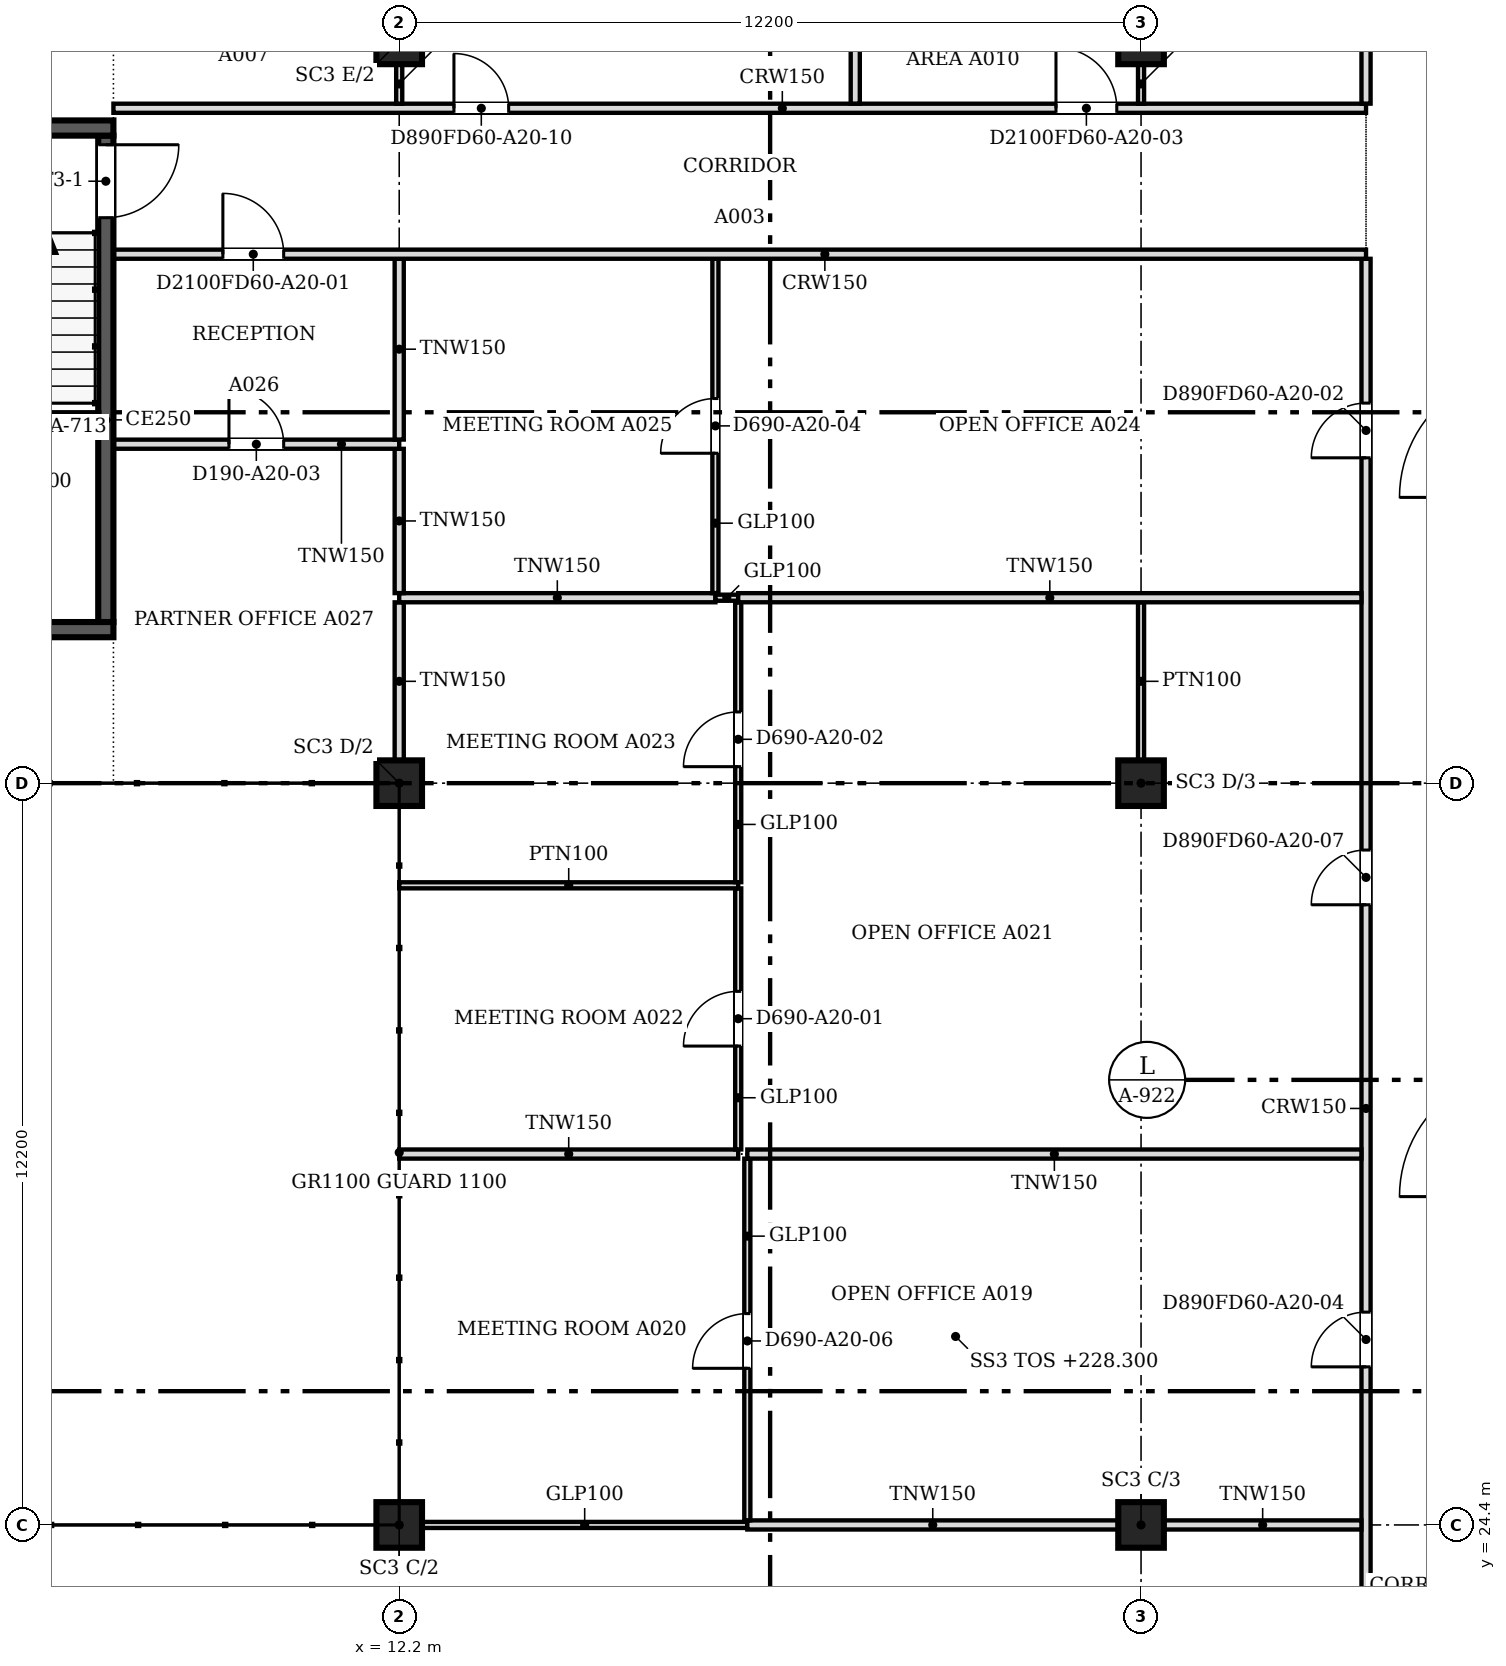
"""IFC4 building model, lengths in metres.
Left out: names, types, materials, properties, quantities, classifications, styles, units other than length and angle.
Written with IfcOpenShell. Run it as: python <this file> out.ifc"""

import sys

from ifc_helpers import new_model, si_unit, direction, frame, frame_2d, origin, origin_2d, place, context, subcontext, project, spatial, rectangle, extrude, source, transform, mapped, element, fill, save


model = new_model("IFC4")
c1 = context("Model", 3, precision=1e-05, world=origin(), true_north=direction((0.0, 1.0)))
c2 = subcontext(c1, "Body", "Model", "MODEL_VIEW")
j1 = project(units=[si_unit("LENGTHUNIT", "METRE"), si_unit("PLANEANGLEUNIT", "RADIAN")], contexts=[c1])
p1 = place(None, origin())
s1 = spatial("IfcSite", under=j1, at=p1, CompositionType="ELEMENT")
p2 = place(p1, origin())
s2 = spatial("IfcBuilding", under=s1, at=p2, CompositionType="ELEMENT")
p3 = place(p2, frame((0.0, 0.0, 228.3)))
s3 = spatial("IfcBuildingStorey", under=s2, at=p3, CompositionType="ELEMENT", Elevation=228.3)
for number, where, z_axis, x_axis in (
    (1, (12.2, 24.4, 0.0), (0.0, 0.0, 1.0), (1.0, 0.0, 0.0)),
    (2, (12.2, 36.6, 0.0), (0.0, 0.0, 1.0), (1.0, 0.0, 0.0)),
    (3, (12.2, 48.8, 0.0), (0.0, 0.0, 1.0), (1.0, 0.0, 0.0)),
    (4, (24.4, 24.4, 0.0), (0.0, 0.0, 1.0), (1.0, 0.0, 0.0)),
    (5, (24.4, 36.6, 0.0), (0.0, 0.0, 1.0), (1.0, 0.0, 0.0)),
    (6, (24.4, 48.8, 0.0), (0.0, 0.0, 1.0), (1.0, 0.0, 0.0)),
):
    element("IfcColumn", number, at=place(p3, frame(where, z_axis=z_axis, x_axis=x_axis)), inside=s3, PredefinedType="COLUMN", context=c2, shape_type="SweptSolid", body=[
        extrude(rectangle(XDim=0.75, YDim=0.75, at=origin_2d()), origin(), (0.0, 0.0, 1.0), 3.5),
    ])
for number, where, z_axis, x_axis in (
    (7, (7.5, 39.125, 0.0), (0.0, 0.0, 1.0), (-1.0, 0.0, 0.0)),
    (8, (3.6, 47.375, 0.0), (0.0, 0.0, 1.0), (1.0, 0.0, 0.0)),
):
    element("IfcWall", number, at=place(p3, frame(where, z_axis=z_axis, x_axis=x_axis)), inside=s3, PredefinedType="SOLIDWALL", context=c2, shape_type="SweptSolid", body=[
        extrude(rectangle(XDim=3.9, YDim=0.25, at=frame_2d((1.95, 0.0))), origin(), (0.0, 0.0, 1.0), 3.8),
    ])
p4 = place(p3, frame((7.375, 47.25, 0.0), z_axis=(0.0, 0.0, 1.0), x_axis=(0.0, -1.0, 0.0)))
e9 = element("IfcWall", 9, at=p4, inside=s3, PredefinedType="SOLIDWALL", context=c2, shape_type="SweptSolid", body=[
    extrude(rectangle(XDim=8.0, YDim=0.25, at=frame_2d((4.0, 0.0))), origin(), (0.0, 0.0, 1.0), 3.8),
])
m1 = source(origin(), c2, "Body", "SweptSolid", [
    extrude(rectangle(XDim=1.2, YDim=2.1, at=frame_2d((0.6, 1.05))), frame((0.0, 0.135, 0.0), z_axis=(0.0, -1.0, 0.0), x_axis=(1.0, 0.0, 0.0)), (0.0, 0.0, 1.0), 0.27),
])
p5 = place(p4, frame((0.15, 0.0, 0.0)))
e10 = element("IfcOpeningElement", 10, at=p5, cuts=e9, PredefinedType="OPENING", context=c2, shape_type="MappedRepresentation", body=[
    mapped(m1, transform((0.0, 0.0, 0.0), scale=1.0)),
])
p6 = place(p3, frame((28.1, 18.8, 0.0), z_axis=(0.0, 0.0, 1.0), x_axis=(0.0, 1.0, 0.0)))
e11 = element("IfcWall", 11, at=p6, inside=s3, PredefinedType="PARTITIONING", context=c2, shape_type="SweptSolid", body=[
    extrude(rectangle(XDim=26.424, YDim=0.15, at=frame_2d((13.212, 0.0))), origin(), (0.0, 0.0, 1.0), 2.888),
])
m2 = source(origin(), c2, "Body", "SweptSolid", [
    extrude(rectangle(XDim=0.9, YDim=2.1, at=frame_2d((0.45, 1.05))), frame((0.0, 0.085, 0.0), z_axis=(0.0, -1.0, 0.0), x_axis=(1.0, 0.0, 0.0)), (0.0, 0.0, 1.0), 0.17),
])
p7 = place(p6, frame((1.1, 0.0, 0.0)))
e12 = element("IfcOpeningElement", 12, at=p7, cuts=e11, PredefinedType="OPENING", context=c2, shape_type="MappedRepresentation", body=[
    mapped(m2, transform((0.0, 0.0, 0.0), scale=1.0)),
])
p8 = place(p6, frame((23.151, 0.0, 0.0)))
e13 = element("IfcOpeningElement", 13, at=p8, cuts=e11, PredefinedType="OPENING", context=c2, shape_type="MappedRepresentation", body=[
    mapped(m2, transform((0.0, 0.0, 0.0), scale=1.0)),
])
p9 = place(p6, frame((8.2, 0.0, 0.0)))
e14 = element("IfcOpeningElement", 14, at=p9, cuts=e11, PredefinedType="OPENING", context=c2, shape_type="MappedRepresentation", body=[
    mapped(m2, transform((0.0, 0.0, 0.0), scale=1.0)),
])
p10 = place(p6, frame((15.8, 0.0, 0.0)))
e15 = element("IfcOpeningElement", 15, at=p10, cuts=e11, PredefinedType="OPENING", context=c2, shape_type="MappedRepresentation", body=[
    mapped(m2, transform((0.0, 0.0, 0.0), scale=1.0)),
])
p11 = place(p3, frame((12.576, 24.4, 0.0), z_axis=(0.0, 0.0, 1.0), x_axis=(1.0, 0.0, 0.0)))
e16 = element("IfcWall", 16, at=p11, inside=s3, PredefinedType="PARTITIONING", context=c2, shape_type="SweptSolid", body=[
    extrude(rectangle(XDim=5.348, YDim=0.1, at=frame_2d((2.674, 0.0))), origin(), (0.0, 0.0, 1.0), 2.888),
])
p12 = place(p3, frame((17.925, 24.4, 0.0), z_axis=(0.0, 0.0, 1.0), x_axis=(1.0, 0.0, 0.0)))
e17 = element("IfcWall", 17, at=p12, inside=s3, PredefinedType="PARTITIONING", context=c2, shape_type="SweptSolid", body=[
    extrude(rectangle(XDim=6.099, YDim=0.15, at=frame_2d((3.049, 0.0))), origin(), (0.0, 0.0, 1.0), 2.888),
])
p13 = place(p3, frame((24.776, 24.4, 0.0), z_axis=(0.0, 0.0, 1.0), x_axis=(1.0, 0.0, 0.0)))
e18 = element("IfcWall", 18, at=p13, inside=s3, PredefinedType="PARTITIONING", context=c2, shape_type="SweptSolid", body=[
    extrude(rectangle(XDim=3.248, YDim=0.15, at=frame_2d((1.624, 0.0))), origin(), (0.0, 0.0, 1.0), 2.888),
])
p14 = place(p3, frame((17.925, 24.476, 0.0), z_axis=(0.0, 0.0, 1.0), x_axis=(0.0, 1.0, 0.0)))
e19 = element("IfcWall", 19, at=p14, inside=s3, PredefinedType="PARTITIONING", context=c2, shape_type="SweptSolid", body=[
    extrude(rectangle(XDim=5.948, YDim=0.1, at=frame_2d((2.974, 0.0))), origin(), (0.0, 0.0, 1.0), 2.888),
])
m3 = source(origin(), c2, "Body", "SweptSolid", [
    extrude(rectangle(XDim=0.9, YDim=2.1, at=frame_2d((0.45, 1.05))), frame((0.0, 0.06, 0.0), z_axis=(0.0, -1.0, 0.0), x_axis=(1.0, 0.0, 0.0)), (0.0, 0.0, 1.0), 0.12),
])
p15 = place(p14, frame((2.5, 0.0, 0.0)))
e20 = element("IfcOpeningElement", 20, at=p15, cuts=e19, PredefinedType="OPENING", context=c2, shape_type="MappedRepresentation", body=[
    mapped(m3, transform((0.0, 0.0, 0.0), scale=1.0)),
])
p16 = place(p3, frame((12.2, 30.5, 0.0), z_axis=(0.0, 0.0, 1.0), x_axis=(1.0, 0.0, 0.0)))
e21 = element("IfcWall", 21, at=p16, inside=s3, PredefinedType="PARTITIONING", context=c2, shape_type="SweptSolid", body=[
    extrude(rectangle(XDim=5.575, YDim=0.15, at=frame_2d((2.788, 0.0))), origin(), (0.0, 0.0, 1.0), 2.888),
])
p17 = place(p3, frame((17.925, 30.5, 0.0), z_axis=(0.0, 0.0, 1.0), x_axis=(1.0, 0.0, 0.0)))
e22 = element("IfcWall", 22, at=p17, inside=s3, PredefinedType="PARTITIONING", context=c2, shape_type="SweptSolid", body=[
    extrude(rectangle(XDim=10.099, YDim=0.15, at=frame_2d((5.049, 0.0))), origin(), (0.0, 0.0, 1.0), 2.888),
])
p18 = place(p3, frame((17.775, 30.576, 0.0), z_axis=(0.0, 0.0, 1.0), x_axis=(0.0, 1.0, 0.0)))
e23 = element("IfcWall", 23, at=p18, inside=s3, PredefinedType="PARTITIONING", context=c2, shape_type="SweptSolid", body=[
    extrude(rectangle(XDim=4.293, YDim=0.1, at=frame_2d((2.147, 0.0))), origin(), (0.0, 0.0, 1.0), 2.888),
])
p19 = place(p18, frame((1.7, 0.0, 0.0)))
e24 = element("IfcOpeningElement", 24, at=p19, cuts=e23, PredefinedType="OPENING", context=c2, shape_type="MappedRepresentation", body=[
    mapped(m3, transform((0.0, 0.0, 0.0), scale=1.0)),
])
p20 = place(p3, frame((12.2, 34.92, 0.0), z_axis=(0.0, 0.0, 1.0), x_axis=(1.0, 0.0, 0.0)))
e25 = element("IfcWall", 25, at=p20, inside=s3, PredefinedType="PARTITIONING", context=c2, shape_type="SweptSolid", body=[
    extrude(rectangle(XDim=5.575, YDim=0.1, at=frame_2d((2.788, 0.0))), origin(), (0.0, 0.0, 1.0), 2.888),
])
p21 = place(p3, frame((17.775, 34.971, 0.0), z_axis=(0.0, 0.0, 1.0), x_axis=(0.0, 1.0, 0.0)))
e26 = element("IfcWall", 26, at=p21, inside=s3, PredefinedType="PARTITIONING", context=c2, shape_type="SweptSolid", body=[
    extrude(rectangle(XDim=4.603, YDim=0.1, at=frame_2d((2.301, 0.0))), origin(), (0.0, 0.0, 1.0), 2.888),
])
p22 = place(p21, frame((1.9, 0.0, 0.0)))
e27 = element("IfcOpeningElement", 27, at=p22, cuts=e26, PredefinedType="OPENING", context=c2, shape_type="MappedRepresentation", body=[
    mapped(m3, transform((0.0, 0.0, 0.0), scale=1.0)),
])
p23 = place(p3, frame((12.2, 36.976, 0.0), z_axis=(0.0, 0.0, 1.0), x_axis=(0.0, 1.0, 0.0)))
e28 = element("IfcWall", 28, at=p23, inside=s3, PredefinedType="PARTITIONING", context=c2, shape_type="SweptSolid", body=[
    extrude(rectangle(XDim=2.598, YDim=0.15, at=frame_2d((1.299, 0.0))), origin(), (0.0, 0.0, 1.0), 2.888),
])
p24 = place(p3, frame((24.4, 36.975, 0.0), z_axis=(0.0, 0.0, 1.0), x_axis=(0.0, 1.0, 0.0)))
e29 = element("IfcWall", 29, at=p24, inside=s3, PredefinedType="PARTITIONING", context=c2, shape_type="SweptSolid", body=[
    extrude(rectangle(XDim=2.6, YDim=0.1, at=frame_2d((1.3, 0.0))), origin(), (0.0, 0.0, 1.0), 2.888),
])
p25 = place(p3, frame((12.2, 39.65, 0.0), z_axis=(0.0, 0.0, 1.0), x_axis=(1.0, 0.0, 0.0)))
e30 = element("IfcWall", 30, at=p25, inside=s3, PredefinedType="PARTITIONING", context=c2, shape_type="SweptSolid", body=[
    extrude(rectangle(XDim=5.2, YDim=0.15, at=frame_2d((2.6, 0.0))), origin(), (0.0, 0.0, 1.0), 2.888),
])
p26 = place(p3, frame((17.401, 39.65, 0.0), z_axis=(0.0, 0.0, 1.0), x_axis=(1.0, 0.0, 0.0)))
e31 = element("IfcWall", 31, at=p26, inside=s3, PredefinedType="PARTITIONING", context=c2, shape_type="SweptSolid", body=[
    extrude(rectangle(XDim=0.373, YDim=0.1, at=frame_2d((0.187, 0.0))), origin(), (0.0, 0.0, 1.0), 2.888),
])
p27 = place(p3, frame((17.775, 39.65, 0.0), z_axis=(0.0, 0.0, 1.0), x_axis=(1.0, 0.0, 0.0)))
e32 = element("IfcWall", 32, at=p27, inside=s3, PredefinedType="PARTITIONING", context=c2, shape_type="SweptSolid", body=[
    extrude(rectangle(XDim=10.249, YDim=0.15, at=frame_2d((5.125, 0.0))), origin(), (0.0, 0.0, 1.0), 2.888),
])
p28 = place(p3, frame((12.2, 39.726, 0.0), z_axis=(0.0, 0.0, 1.0), x_axis=(0.0, 1.0, 0.0)))
e33 = element("IfcWall", 33, at=p28, inside=s3, PredefinedType="PARTITIONING", context=c2, shape_type="SweptSolid", body=[
    extrude(rectangle(XDim=2.373, YDim=0.15, at=frame_2d((1.187, 0.0))), origin(), (0.0, 0.0, 1.0), 2.888),
])
p29 = place(p3, frame((17.4, 39.726, 0.0), z_axis=(0.0, 0.0, 1.0), x_axis=(0.0, 1.0, 0.0)))
e34 = element("IfcWall", 34, at=p29, inside=s3, PredefinedType="PARTITIONING", context=c2, shape_type="SweptSolid", body=[
    extrude(rectangle(XDim=5.498, YDim=0.1, at=frame_2d((2.749, 0.0))), origin(), (0.0, 0.0, 1.0), 2.888),
])
p30 = place(p29, frame((2.3, 0.0, 0.0)))
e35 = element("IfcOpeningElement", 35, at=p30, cuts=e34, PredefinedType="OPENING", context=c2, shape_type="MappedRepresentation", body=[
    mapped(m3, transform((0.0, 0.0, 0.0), scale=1.0)),
])
p31 = place(p3, frame((12.2, 42.175, 0.0), z_axis=(0.0, 0.0, 1.0), x_axis=(-1.0, 0.0, 0.0)))
e36 = element("IfcWall", 36, at=p31, inside=s3, PredefinedType="PARTITIONING", context=c2, shape_type="SweptSolid", body=[
    extrude(rectangle(XDim=4.7, YDim=0.15, at=frame_2d((2.35, 0.0))), origin(), (0.0, 0.0, 1.0), 2.888),
])
p32 = place(p31, frame((1.9, 0.0, 0.0)))
e37 = element("IfcOpeningElement", 37, at=p32, cuts=e36, PredefinedType="OPENING", context=c2, shape_type="MappedRepresentation", body=[
    mapped(m2, transform((0.0, 0.0, 0.0), scale=1.0)),
])
p33 = place(p3, frame((12.2, 42.251, 0.0), z_axis=(0.0, 0.0, 1.0), x_axis=(0.0, 1.0, 0.0)))
e38 = element("IfcWall", 38, at=p33, inside=s3, PredefinedType="PARTITIONING", context=c2, shape_type="SweptSolid", body=[
    extrude(rectangle(XDim=2.973, YDim=0.15, at=frame_2d((1.487, 0.0))), origin(), (0.0, 0.0, 1.0), 2.888),
])
p34 = place(p3, frame((28.1, 45.3, 0.0), z_axis=(0.0, 0.0, 1.0), x_axis=(-1.0, 0.0, 0.0)))
e39 = element("IfcWall", 39, at=p34, inside=s3, PredefinedType="PARTITIONING", context=c2, shape_type="SweptSolid", body=[
    extrude(rectangle(XDim=20.6, YDim=0.15, at=frame_2d((10.3, 0.0))), origin(), (0.0, 0.0, 1.0), 2.888),
])
m4 = source(origin(), c2, "Body", "SweptSolid", [
    extrude(rectangle(XDim=1.0, YDim=2.1, at=frame_2d((0.5, 1.05))), frame((0.0, 0.085, 0.0), z_axis=(0.0, -1.0, 0.0), x_axis=(1.0, 0.0, 0.0)), (0.0, 0.0, 1.0), 0.17),
])
p35 = place(p34, frame((17.8, 0.0, 0.0)))
e40 = element("IfcOpeningElement", 40, at=p35, cuts=e39, PredefinedType="OPENING", context=c2, shape_type="MappedRepresentation", body=[
    mapped(m4, transform((0.0, 0.0, 0.0), scale=1.0)),
])
p36 = place(p3, frame((7.5, 47.7, 0.0), z_axis=(0.0, 0.0, 1.0), x_axis=(1.0, 0.0, 0.0)))
e41 = element("IfcWall", 41, at=p36, inside=s3, PredefinedType="PARTITIONING", context=c2, shape_type="SweptSolid", body=[
    extrude(rectangle(XDim=20.6, YDim=0.15, at=frame_2d((10.3, 0.0))), origin(), (0.0, 0.0, 1.0), 2.888),
])
p37 = place(p36, frame((15.501, 0.0, 0.0)))
e42 = element("IfcOpeningElement", 42, at=p37, cuts=e41, PredefinedType="OPENING", context=c2, shape_type="MappedRepresentation", body=[
    mapped(m4, transform((0.0, 0.0, 0.0), scale=1.0)),
])
p38 = place(p36, frame((5.6, 0.0, 0.0)))
e43 = element("IfcOpeningElement", 43, at=p38, cuts=e41, PredefinedType="OPENING", context=c2, shape_type="MappedRepresentation", body=[
    mapped(m2, transform((0.0, 0.0, 0.0), scale=1.0)),
])
p39 = place(p3, frame((19.7, 47.776, 0.0), z_axis=(0.0, 0.0, 1.0), x_axis=(0.0, 1.0, 0.0)))
e44 = element("IfcWall", 44, at=p39, inside=s3, PredefinedType="PARTITIONING", context=c2, shape_type="SweptSolid", body=[
    extrude(rectangle(XDim=2.698, YDim=0.15, at=frame_2d((1.349, 0.0))), origin(), (0.0, 0.0, 1.0), 2.888),
])
p40 = place(p3, frame((28.1, 47.776, 0.0), z_axis=(0.0, 0.0, 1.0), x_axis=(0.0, 1.0, 0.0)))
e45 = element("IfcWall", 45, at=p40, inside=s3, PredefinedType="PARTITIONING", context=c2, shape_type="SweptSolid", body=[
    extrude(rectangle(XDim=3.348, YDim=0.15, at=frame_2d((1.674, 0.0))), origin(), (0.0, 0.0, 1.0), 2.888),
])
for number, where, z_axis, x_axis in (
    (46, (12.2, 48.425, 0.0), (0.0, 0.0, 1.0), (0.0, -1.0, 0.0)),
    (47, (24.4, 48.425, 0.0), (0.0, 0.0, 1.0), (0.0, -1.0, 0.0)),
):
    element("IfcWall", number, at=place(p3, frame(where, z_axis=z_axis, x_axis=x_axis)), inside=s3, PredefinedType="PARTITIONING", context=c2, shape_type="SweptSolid", body=[
        extrude(rectangle(XDim=0.65, YDim=0.1, at=frame_2d((0.325, 0.0))), origin(), (0.0, 0.0, 1.0), 2.888),
    ])
m5 = source(origin(), c2, "Body", "SweptSolid", [
    extrude(rectangle(XDim=1.2, YDim=2.1, at=frame_2d((0.6, 1.05))), frame((0.0, 0.025, 0.0), z_axis=(0.0, -1.0, 0.0), x_axis=(1.0, 0.0, 0.0)), (0.0, 0.0, 1.0), 0.05),
])
p41 = place(p5, origin())
e48 = element("IfcDoor", 48, at=p41, inside=s3, OperationType="SINGLE_SWING_LEFT", PredefinedType="DOOR", context=c2, shape_type="MappedRepresentation", body=[
    mapped(m5, transform((0.0, 0.0, 0.0), scale=1.0)),
])
fill(e10, e48)
m6 = source(origin(), c2, "Body", "SweptSolid", [
    extrude(rectangle(XDim=0.9, YDim=2.1, at=frame_2d((0.45, 1.05))), frame((0.0, 0.025, 0.0), z_axis=(0.0, -1.0, 0.0), x_axis=(1.0, 0.0, 0.0)), (0.0, 0.0, 1.0), 0.05),
])
p42 = place(p19, origin())
e49 = element("IfcDoor", 49, at=p42, inside=s3, OperationType="SINGLE_SWING_LEFT", PredefinedType="DOOR", context=c2, shape_type="MappedRepresentation", body=[
    mapped(m6, transform((0.0, 0.0, 0.0), scale=1.0)),
])
fill(e24, e49)
p43 = place(p22, origin())
e50 = element("IfcDoor", 50, at=p43, inside=s3, OperationType="SINGLE_SWING_LEFT", PredefinedType="DOOR", context=c2, shape_type="MappedRepresentation", body=[
    mapped(m6, transform((0.0, 0.0, 0.0), scale=1.0)),
])
fill(e27, e50)
m7 = source(origin(), c2, "Body", "SweptSolid", [
    extrude(rectangle(XDim=1.0, YDim=2.1, at=frame_2d((0.5, 1.05))), frame((0.0, 0.025, 0.0), z_axis=(0.0, -1.0, 0.0), x_axis=(1.0, 0.0, 0.0)), (0.0, 0.0, 1.0), 0.05),
])
p44 = place(p35, origin())
e51 = element("IfcDoor", 51, at=p44, inside=s3, OperationType="SINGLE_SWING_RIGHT", PredefinedType="DOOR", context=c2, shape_type="MappedRepresentation", body=[
    mapped(m7, transform((0.0, 0.0, 0.0), scale=1.0)),
])
fill(e40, e51)
p45 = place(p32, origin())
e52 = element("IfcDoor", 52, at=p45, inside=s3, OperationType="SINGLE_SWING_RIGHT", PredefinedType="DOOR", context=c2, shape_type="MappedRepresentation", body=[
    mapped(m6, transform((0.0, 0.0, 0.0), scale=1.0)),
])
fill(e37, e52)
p46 = place(p30, origin())
e53 = element("IfcDoor", 53, at=p46, inside=s3, OperationType="SINGLE_SWING_LEFT", PredefinedType="DOOR", context=c2, shape_type="MappedRepresentation", body=[
    mapped(m6, transform((0.0, 0.0, 0.0), scale=1.0)),
])
fill(e35, e53)
p47 = place(p8, origin())
e54 = element("IfcDoor", 54, at=p47, inside=s3, OperationType="SINGLE_SWING_LEFT", PredefinedType="DOOR", context=c2, shape_type="MappedRepresentation", body=[
    mapped(m6, transform((0.0, 0.0, 0.0), scale=1.0)),
])
fill(e13, e54)
p48 = place(p15, origin())
e55 = element("IfcDoor", 55, at=p48, inside=s3, OperationType="SINGLE_SWING_LEFT", PredefinedType="DOOR", context=c2, shape_type="MappedRepresentation", body=[
    mapped(m6, transform((0.0, 0.0, 0.0), scale=1.0)),
])
fill(e20, e55)
p49 = place(p9, origin())
e56 = element("IfcDoor", 56, at=p49, inside=s3, OperationType="SINGLE_SWING_LEFT", PredefinedType="DOOR", context=c2, shape_type="MappedRepresentation", body=[
    mapped(m6, transform((0.0, 0.0, 0.0), scale=1.0)),
])
fill(e14, e56)
p50 = place(p37, origin())
e57 = element("IfcDoor", 57, at=p50, inside=s3, OperationType="SINGLE_SWING_LEFT", PredefinedType="DOOR", context=c2, shape_type="MappedRepresentation", body=[
    mapped(m7, transform((0.0, 0.0, 0.0), scale=1.0)),
])
fill(e42, e57)
p51 = place(p10, origin())
e58 = element("IfcDoor", 58, at=p51, inside=s3, OperationType="SINGLE_SWING_LEFT", PredefinedType="DOOR", context=c2, shape_type="MappedRepresentation", body=[
    mapped(m6, transform((0.0, 0.0, 0.0), scale=1.0)),
])
fill(e15, e58)
p52 = place(p38, origin())
e59 = element("IfcDoor", 59, at=p52, inside=s3, OperationType="SINGLE_SWING_LEFT", PredefinedType="DOOR", context=c2, shape_type="MappedRepresentation", body=[
    mapped(m6, transform((0.0, 0.0, 0.0), scale=1.0)),
])
fill(e43, e59)
save(model, sys.argv[1])
